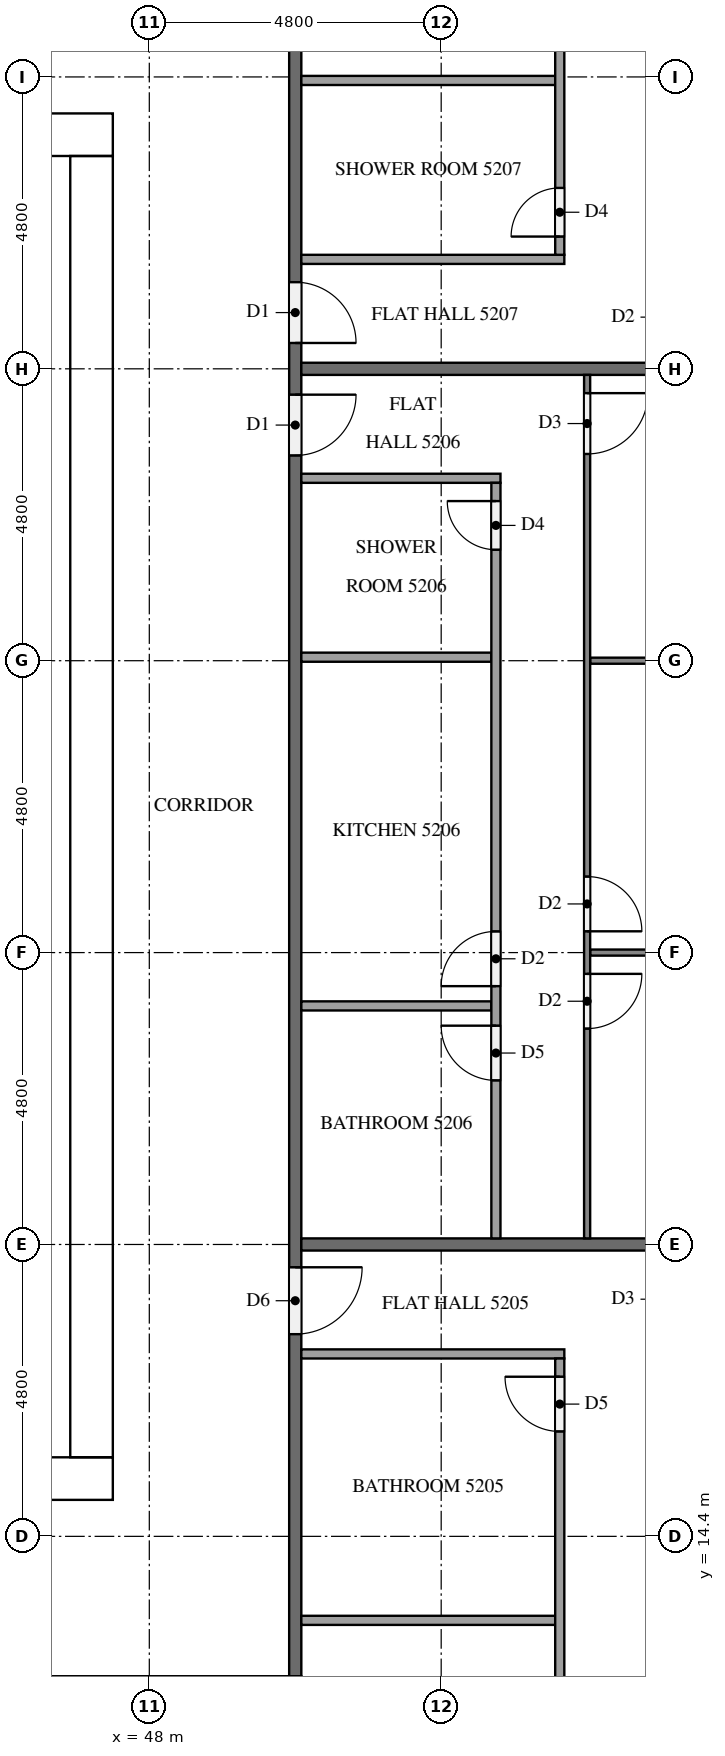
"""IFC4 building model, lengths in metres.
Left out: names, types, materials, properties, quantities, classifications, styles, units other than length and angle.
Written with IfcOpenShell. Run it as: python <this file> out.ifc"""

import sys

from ifc_helpers import new_model, si_unit, direction, frame, frame_2d, origin, place, context, subcontext, project, spatial, rectangle, extrude, element, fill, save


model = new_model("IFC4")
c1 = context("Model", 3, precision=1e-05, world=origin(), true_north=direction((0.0, 1.0)))
c2 = subcontext(c1, "Body", "Model", "MODEL_VIEW")
j1 = project(units=[si_unit("LENGTHUNIT", "METRE"), si_unit("PLANEANGLEUNIT", "RADIAN")], contexts=[c1])
p1 = place(None, origin())
s1 = spatial("IfcSite", under=j1, at=p1, CompositionType="ELEMENT")
p2 = place(p1, origin())
s2 = spatial("IfcBuilding", under=s1, at=p2, CompositionType="ELEMENT")
p3 = place(p2, frame((0.0, 0.0, 199.9)))
s3 = spatial("IfcBuildingStorey", under=s2, at=p3, CompositionType="ELEMENT", Elevation=199.9)
p4 = place(p3, frame((15.0, 15.35, 0.0), z_axis=(0.0, 0.0, 1.0), x_axis=(1.0, 0.0, 0.0)))
e1 = element("IfcWall", 1, at=p4, inside=s3, PredefinedType="SHEAR", context=c2, shape_type="SweptSolid", body=[
    extrude(rectangle(XDim=32.4, YDim=0.7, at=frame_2d((16.2, 0.0))), origin(), (0.0, 0.0, 1.0), 3.1),
])
p5 = place(p4, frame((15.3, 0.0, 0.0)))
e2 = element("IfcOpeningElement", 2, at=p5, cuts=e1, PredefinedType="OPENING", context=c2, shape_type="SweptSolid", body=[
    extrude(rectangle(XDim=1.8, YDim=2.1, at=frame_2d((0.9, 1.05))), frame((0.0, 0.36, 0.0), z_axis=(0.0, -1.0, 0.0), x_axis=(1.0, 0.0, 0.0)), (0.0, 0.0, 1.0), 0.72),
])
p6 = place(p3, frame((15.0, 37.45, 0.0), z_axis=(0.0, 0.0, 1.0), x_axis=(1.0, 0.0, 0.0)))
e3 = element("IfcWall", 3, at=p6, inside=s3, PredefinedType="SHEAR", context=c2, shape_type="SweptSolid", body=[
    extrude(rectangle(XDim=32.4, YDim=0.7, at=frame_2d((16.2, 0.0))), origin(), (0.0, 0.0, 1.0), 3.1),
])
p7 = place(p6, frame((15.3, 0.0, 0.0)))
e4 = element("IfcOpeningElement", 4, at=p7, cuts=e3, PredefinedType="OPENING", context=c2, shape_type="SweptSolid", body=[
    extrude(rectangle(XDim=1.8, YDim=2.1, at=frame_2d((0.9, 1.05))), frame((0.0, 0.36, 0.0), z_axis=(0.0, -1.0, 0.0), x_axis=(1.0, 0.0, 0.0)), (0.0, 0.0, 1.0), 0.72),
])
p8 = place(p6, frame((1.544, 0.0, 0.0)))
e5 = element("IfcOpeningElement", 5, at=p8, cuts=e3, PredefinedType="OPENING", context=c2, shape_type="SweptSolid", body=[
    extrude(rectangle(XDim=1.0, YDim=2.1, at=frame_2d((0.5, 1.05))), frame((0.0, 0.36, 0.0), z_axis=(0.0, -1.0, 0.0), x_axis=(1.0, 0.0, 0.0)), (0.0, 0.0, 1.0), 0.72),
])
p9 = place(p6, frame((5.219, 0.0, 0.0)))
e6 = element("IfcOpeningElement", 6, at=p9, cuts=e3, PredefinedType="OPENING", context=c2, shape_type="SweptSolid", body=[
    extrude(rectangle(XDim=1.0, YDim=2.1, at=frame_2d((0.5, 1.05))), frame((0.0, 0.36, 0.0), z_axis=(0.0, -1.0, 0.0), x_axis=(1.0, 0.0, 0.0)), (0.0, 0.0, 1.0), 0.72),
])
p10 = place(p3, frame((47.05, 15.7, 0.0), z_axis=(0.0, 0.0, 1.0), x_axis=(0.0, 1.0, 0.0)))
e7 = element("IfcWall", 7, at=p10, inside=s3, PredefinedType="SHEAR", context=c2, shape_type="SweptSolid", body=[
    extrude(rectangle(XDim=21.4, YDim=0.7, at=frame_2d((10.7, 0.0))), origin(), (0.0, 0.0, 1.0), 3.1),
])
p11 = place(p10, frame((10.4, 0.0, 0.0)))
e8 = element("IfcOpeningElement", 8, at=p11, cuts=e7, PredefinedType="OPENING", context=c2, shape_type="SweptSolid", body=[
    extrude(rectangle(XDim=1.2, YDim=2.1, at=frame_2d((0.6, 1.05))), frame((0.0, 0.36, 0.0), z_axis=(0.0, -1.0, 0.0), x_axis=(1.0, 0.0, 0.0)), (0.0, 0.0, 1.0), 0.72),
])
p12 = place(p3, frame((50.5, 12.0, 0.0), z_axis=(0.0, 0.0, 1.0), x_axis=(-1.0, 0.0, 0.0)))
e9 = element("IfcWall", 9, at=p12, inside=s3, PredefinedType="PARTITIONING", context=c2, shape_type="SweptSolid", body=[
    extrude(rectangle(XDim=38.6, YDim=0.2, at=frame_2d((19.3, 0.0))), origin(), (0.0, 0.0, 1.0), 3.1),
])
p13 = place(p12, frame((26.875, 0.0, 0.0)))
e10 = element("IfcOpeningElement", 10, at=p13, cuts=e9, PredefinedType="OPENING", context=c2, shape_type="SweptSolid", body=[
    extrude(rectangle(XDim=1.1, YDim=2.1, at=frame_2d((0.55, 1.05))), frame((0.0, 0.11, 0.0), z_axis=(0.0, -1.0, 0.0), x_axis=(1.0, 0.0, 0.0)), (0.0, 0.0, 1.0), 0.22),
])
p14 = place(p12, frame((25.075, 0.0, 0.0)))
e11 = element("IfcOpeningElement", 11, at=p14, cuts=e9, PredefinedType="OPENING", context=c2, shape_type="SweptSolid", body=[
    extrude(rectangle(XDim=1.0, YDim=2.1, at=frame_2d((0.5, 1.05))), frame((0.0, 0.11, 0.0), z_axis=(0.0, -1.0, 0.0), x_axis=(1.0, 0.0, 0.0)), (0.0, 0.0, 1.0), 0.22),
])
p15 = place(p12, frame((10.125, 0.0, 0.0)))
e12 = element("IfcOpeningElement", 12, at=p15, cuts=e9, PredefinedType="OPENING", context=c2, shape_type="SweptSolid", body=[
    extrude(rectangle(XDim=1.0, YDim=2.1, at=frame_2d((0.5, 1.05))), frame((0.0, 0.11, 0.0), z_axis=(0.0, -1.0, 0.0), x_axis=(1.0, 0.0, 0.0)), (0.0, 0.0, 1.0), 0.22),
])
p16 = place(p12, frame((8.275, 0.0, 0.0)))
e13 = element("IfcOpeningElement", 13, at=p16, cuts=e9, PredefinedType="OPENING", context=c2, shape_type="SweptSolid", body=[
    extrude(rectangle(XDim=1.0, YDim=2.1, at=frame_2d((0.5, 1.05))), frame((0.0, 0.11, 0.0), z_axis=(0.0, -1.0, 0.0), x_axis=(1.0, 0.0, 0.0)), (0.0, 0.0, 1.0), 0.22),
])
p17 = place(p3, frame((50.4, 40.7, 0.0), z_axis=(0.0, 0.0, 1.0), x_axis=(0.0, -1.0, 0.0)))
e14 = element("IfcWall", 14, at=p17, inside=s3, PredefinedType="PARTITIONING", context=c2, shape_type="SweptSolid", body=[
    extrude(rectangle(XDim=28.6, YDim=0.2, at=frame_2d((14.3, 0.0))), origin(), (0.0, 0.0, 1.0), 3.1),
])
p18 = place(p17, frame((21.875, 0.0, 0.0)))
e15 = element("IfcOpeningElement", 15, at=p18, cuts=e14, PredefinedType="OPENING", context=c2, shape_type="SweptSolid", body=[
    extrude(rectangle(XDim=1.1, YDim=2.1, at=frame_2d((0.55, 1.05))), frame((0.0, 0.11, 0.0), z_axis=(0.0, -1.0, 0.0), x_axis=(1.0, 0.0, 0.0)), (0.0, 0.0, 1.0), 0.22),
])
p19 = place(p17, frame((7.525, 0.0, 0.0)))
e16 = element("IfcOpeningElement", 16, at=p19, cuts=e14, PredefinedType="OPENING", context=c2, shape_type="SweptSolid", body=[
    extrude(rectangle(XDim=1.0, YDim=2.1, at=frame_2d((0.5, 1.05))), frame((0.0, 0.11, 0.0), z_axis=(0.0, -1.0, 0.0), x_axis=(1.0, 0.0, 0.0)), (0.0, 0.0, 1.0), 0.22),
])
p20 = place(p17, frame((5.675, 0.0, 0.0)))
e17 = element("IfcOpeningElement", 17, at=p20, cuts=e14, PredefinedType="OPENING", context=c2, shape_type="SweptSolid", body=[
    extrude(rectangle(XDim=1.0, YDim=2.1, at=frame_2d((0.5, 1.05))), frame((0.0, 0.11, 0.0), z_axis=(0.0, -1.0, 0.0), x_axis=(1.0, 0.0, 0.0)), (0.0, 0.0, 1.0), 0.22),
])
p21 = place(p3, frame((50.5, 19.2, 0.0), z_axis=(0.0, 0.0, 1.0), x_axis=(1.0, 0.0, 0.0)))
e18 = element("IfcWall", 18, at=p21, inside=s3, PredefinedType="PARTITIONING", context=c2, shape_type="SweptSolid", body=[
    extrude(rectangle(XDim=11.8, YDim=0.2, at=frame_2d((5.9, 0.0))), origin(), (0.0, 0.0, 1.0), 3.1),
])
p22 = place(p3, frame((50.5, 33.6, 0.0), z_axis=(0.0, 0.0, 1.0), x_axis=(1.0, 0.0, 0.0)))
e19 = element("IfcWall", 19, at=p22, inside=s3, PredefinedType="PARTITIONING", context=c2, shape_type="SweptSolid", body=[
    extrude(rectangle(XDim=11.575, YDim=0.2, at=frame_2d((5.788, 0.0))), origin(), (0.0, 0.0, 1.0), 3.1),
])
p23 = place(p3, frame((50.5, 13.019, 0.0), z_axis=(0.0, 0.0, 1.0), x_axis=(1.0, 0.0, 0.0)))
e20 = element("IfcWall", 20, at=p23, inside=s3, PredefinedType="PARTITIONING", context=c2, shape_type="SweptSolid", body=[
    extrude(rectangle(XDim=4.175, YDim=0.15, at=frame_2d((2.087, 0.0))), origin(), (0.0, 0.0, 1.0), 3.1),
])
p24 = place(p3, frame((50.5, 17.4, 0.0), z_axis=(0.0, 0.0, 1.0), x_axis=(1.0, 0.0, 0.0)))
e21 = element("IfcWall", 21, at=p24, inside=s3, PredefinedType="PARTITIONING", context=c2, shape_type="SweptSolid", body=[
    extrude(rectangle(XDim=4.325, YDim=0.15, at=frame_2d((2.163, 0.0))), origin(), (0.0, 0.0, 1.0), 3.1),
])
p25 = place(p3, frame((54.75, 0.1, 0.0), z_axis=(0.0, 0.0, 1.0), x_axis=(0.0, 1.0, 0.0)))
e22 = element("IfcWall", 22, at=p25, inside=s3, PredefinedType="PARTITIONING", context=c2, shape_type="SweptSolid", body=[
    extrude(rectangle(XDim=17.225, YDim=0.15, at=frame_2d((8.612, 0.0))), origin(), (0.0, 0.0, 1.0), 3.1),
])
p26 = place(p25, frame((16.025, 0.0, 0.0)))
e23 = element("IfcOpeningElement", 23, at=p26, cuts=e22, PredefinedType="OPENING", context=c2, shape_type="SweptSolid", body=[
    extrude(rectangle(XDim=0.9, YDim=2.1, at=frame_2d((0.45, 1.05))), frame((0.0, 0.085, 0.0), z_axis=(0.0, -1.0, 0.0), x_axis=(1.0, 0.0, 0.0)), (0.0, 0.0, 1.0), 0.17),
])
p27 = place(p25, frame((10.014, 0.0, 0.0)))
e24 = element("IfcOpeningElement", 24, at=p27, cuts=e22, PredefinedType="OPENING", context=c2, shape_type="SweptSolid", body=[
    extrude(rectangle(XDim=0.8, YDim=2.1, at=frame_2d((0.4, 1.05))), frame((0.0, 0.085, 0.0), z_axis=(0.0, -1.0, 0.0), x_axis=(1.0, 0.0, 0.0)), (0.0, 0.0, 1.0), 0.17),
])
p28 = place(p25, frame((8.464, 0.0, 0.0)))
e25 = element("IfcOpeningElement", 25, at=p28, cuts=e22, PredefinedType="OPENING", context=c2, shape_type="SweptSolid", body=[
    extrude(rectangle(XDim=0.9, YDim=2.1, at=frame_2d((0.45, 1.05))), frame((0.0, 0.085, 0.0), z_axis=(0.0, -1.0, 0.0), x_axis=(1.0, 0.0, 0.0)), (0.0, 0.0, 1.0), 0.17),
])
p29 = place(p25, frame((0.35, 0.0, 0.0)))
e26 = element("IfcOpeningElement", 26, at=p29, cuts=e22, PredefinedType="OPENING", context=c2, shape_type="SweptSolid", body=[
    extrude(rectangle(XDim=0.8, YDim=2.1, at=frame_2d((0.4, 1.05))), frame((0.0, 0.085, 0.0), z_axis=(0.0, -1.0, 0.0), x_axis=(1.0, 0.0, 0.0)), (0.0, 0.0, 1.0), 0.17),
])
p30 = place(p3, frame((55.25, 28.8, 0.0), z_axis=(0.0, 0.0, 1.0), x_axis=(1.0, 0.0, 0.0)))
e27 = element("IfcWall", 27, at=p30, inside=s3, PredefinedType="PARTITIONING", context=c2, shape_type="SweptSolid", body=[
    extrude(rectangle(XDim=7.05, YDim=0.1, at=frame_2d((3.525, 0.0))), origin(), (0.0, 0.0, 1.0), 3.1),
])
p31 = place(p3, frame((55.25, 24.0, 0.0), z_axis=(0.0, 0.0, 1.0), x_axis=(1.0, 0.0, 0.0)))
e28 = element("IfcWall", 28, at=p31, inside=s3, PredefinedType="PARTITIONING", context=c2, shape_type="SweptSolid", body=[
    extrude(rectangle(XDim=6.825, YDim=0.1, at=frame_2d((3.413, 0.0))), origin(), (0.0, 0.0, 1.0), 3.1),
])
p32 = place(p3, frame((55.2, 33.5, 0.0), z_axis=(0.0, 0.0, 1.0), x_axis=(0.0, -1.0, 0.0)))
e29 = element("IfcWall", 29, at=p32, inside=s3, PredefinedType="PARTITIONING", context=c2, shape_type="SweptSolid", body=[
    extrude(rectangle(XDim=14.2, YDim=0.1, at=frame_2d((7.1, 0.0))), origin(), (0.0, 0.0, 1.0), 3.1),
])
p33 = place(p32, frame((0.3, 0.0, 0.0)))
e30 = element("IfcOpeningElement", 30, at=p33, cuts=e29, PredefinedType="OPENING", context=c2, shape_type="SweptSolid", body=[
    extrude(rectangle(XDim=1.0, YDim=2.1, at=frame_2d((0.5, 1.05))), frame((0.0, 0.06, 0.0), z_axis=(0.0, -1.0, 0.0), x_axis=(1.0, 0.0, 0.0)), (0.0, 0.0, 1.0), 0.12),
])
p34 = place(p32, frame((8.25, 0.0, 0.0)))
e31 = element("IfcOpeningElement", 31, at=p34, cuts=e29, PredefinedType="OPENING", context=c2, shape_type="SweptSolid", body=[
    extrude(rectangle(XDim=0.9, YDim=2.1, at=frame_2d((0.45, 1.05))), frame((0.0, 0.06, 0.0), z_axis=(0.0, -1.0, 0.0), x_axis=(1.0, 0.0, 0.0)), (0.0, 0.0, 1.0), 0.12),
])
p35 = place(p32, frame((9.85, 0.0, 0.0)))
e32 = element("IfcOpeningElement", 32, at=p35, cuts=e29, PredefinedType="OPENING", context=c2, shape_type="SweptSolid", body=[
    extrude(rectangle(XDim=0.9, YDim=2.1, at=frame_2d((0.45, 1.05))), frame((0.0, 0.06, 0.0), z_axis=(0.0, -1.0, 0.0), x_axis=(1.0, 0.0, 0.0)), (0.0, 0.0, 1.0), 0.12),
])
for number, where, z_axis, x_axis in (
    (33, (50.5, 28.858, 0.0), (0.0, 0.0, 1.0), (1.0, 0.0, 0.0)),
    (34, (50.5, 23.123, 0.0), (0.0, 0.0, 1.0), (1.0, 0.0, 0.0)),
):
    element("IfcWall", number, at=place(p3, frame(where, z_axis=z_axis, x_axis=x_axis)), inside=s3, PredefinedType="PARTITIONING", context=c2, shape_type="SweptSolid", body=[
        extrude(rectangle(XDim=3.125, YDim=0.15, at=frame_2d((1.562, 0.0))), origin(), (0.0, 0.0, 1.0), 3.1),
    ])
p36 = place(p3, frame((50.5, 31.8, 0.0), z_axis=(0.0, 0.0, 1.0), x_axis=(1.0, 0.0, 0.0)))
e35 = element("IfcWall", 35, at=p36, inside=s3, PredefinedType="PARTITIONING", context=c2, shape_type="SweptSolid", body=[
    extrude(rectangle(XDim=3.275, YDim=0.15, at=frame_2d((1.637, 0.0))), origin(), (0.0, 0.0, 1.0), 3.1),
])
p37 = place(p3, frame((53.7, 19.3, 0.0), z_axis=(0.0, 0.0, 1.0), x_axis=(0.0, 1.0, 0.0)))
e36 = element("IfcWall", 36, at=p37, inside=s3, PredefinedType="PARTITIONING", context=c2, shape_type="SweptSolid", body=[
    extrude(rectangle(XDim=12.425, YDim=0.15, at=frame_2d((6.212, 0.0))), origin(), (0.0, 0.0, 1.0), 3.1),
])
p38 = place(p37, frame((11.325, 0.0, 0.0)))
e37 = element("IfcOpeningElement", 37, at=p38, cuts=e36, PredefinedType="OPENING", context=c2, shape_type="SweptSolid", body=[
    extrude(rectangle(XDim=0.8, YDim=2.1, at=frame_2d((0.4, 1.05))), frame((0.0, 0.085, 0.0), z_axis=(0.0, -1.0, 0.0), x_axis=(1.0, 0.0, 0.0)), (0.0, 0.0, 1.0), 0.17),
])
p39 = place(p37, frame((4.148, 0.0, 0.0)))
e38 = element("IfcOpeningElement", 38, at=p39, cuts=e36, PredefinedType="OPENING", context=c2, shape_type="SweptSolid", body=[
    extrude(rectangle(XDim=0.9, YDim=2.1, at=frame_2d((0.45, 1.05))), frame((0.0, 0.085, 0.0), z_axis=(0.0, -1.0, 0.0), x_axis=(1.0, 0.0, 0.0)), (0.0, 0.0, 1.0), 0.17),
])
p40 = place(p37, frame((2.598, 0.0, 0.0)))
e39 = element("IfcOpeningElement", 39, at=p40, cuts=e36, PredefinedType="OPENING", context=c2, shape_type="SweptSolid", body=[
    extrude(rectangle(XDim=0.9, YDim=2.1, at=frame_2d((0.45, 1.05))), frame((0.0, 0.085, 0.0), z_axis=(0.0, -1.0, 0.0), x_axis=(1.0, 0.0, 0.0)), (0.0, 0.0, 1.0), 0.17),
])
p41 = place(p3, frame((50.5, 38.342, 0.0), z_axis=(0.0, 0.0, 1.0), x_axis=(1.0, 0.0, 0.0)))
e40 = element("IfcWall", 40, at=p41, inside=s3, PredefinedType="PARTITIONING", context=c2, shape_type="SweptSolid", body=[
    extrude(rectangle(XDim=4.175, YDim=0.15, at=frame_2d((2.087, 0.0))), origin(), (0.0, 0.0, 1.0), 3.1),
])
p42 = place(p3, frame((50.5, 35.4, 0.0), z_axis=(0.0, 0.0, 1.0), x_axis=(1.0, 0.0, 0.0)))
e41 = element("IfcWall", 41, at=p42, inside=s3, PredefinedType="PARTITIONING", context=c2, shape_type="SweptSolid", body=[
    extrude(rectangle(XDim=4.325, YDim=0.15, at=frame_2d((2.163, 0.0))), origin(), (0.0, 0.0, 1.0), 3.1),
])
p43 = place(p3, frame((54.75, 35.475, 0.0), z_axis=(0.0, 0.0, 1.0), x_axis=(0.0, 1.0, 0.0)))
e42 = element("IfcWall", 42, at=p43, inside=s3, PredefinedType="PARTITIONING", context=c2, shape_type="SweptSolid", body=[
    extrude(rectangle(XDim=12.425, YDim=0.15, at=frame_2d((6.212, 0.0))), origin(), (0.0, 0.0, 1.0), 3.1),
])
p44 = place(p43, frame((0.3, 0.0, 0.0)))
e43 = element("IfcOpeningElement", 43, at=p44, cuts=e42, PredefinedType="OPENING", context=c2, shape_type="SweptSolid", body=[
    extrude(rectangle(XDim=0.8, YDim=2.1, at=frame_2d((0.4, 1.05))), frame((0.0, 0.085, 0.0), z_axis=(0.0, -1.0, 0.0), x_axis=(1.0, 0.0, 0.0)), (0.0, 0.0, 1.0), 0.17),
])
p45 = place(p43, frame((5.465, 0.0, 0.0)))
e44 = element("IfcOpeningElement", 44, at=p45, cuts=e42, PredefinedType="OPENING", context=c2, shape_type="SweptSolid", body=[
    extrude(rectangle(XDim=0.9, YDim=2.1, at=frame_2d((0.45, 1.05))), frame((0.0, 0.085, 0.0), z_axis=(0.0, -1.0, 0.0), x_axis=(1.0, 0.0, 0.0)), (0.0, 0.0, 1.0), 0.17),
])
p46 = place(p43, frame((7.015, 0.0, 0.0)))
e45 = element("IfcOpeningElement", 45, at=p46, cuts=e42, PredefinedType="OPENING", context=c2, shape_type="SweptSolid", body=[
    extrude(rectangle(XDim=0.9, YDim=2.1, at=frame_2d((0.45, 1.05))), frame((0.0, 0.085, 0.0), z_axis=(0.0, -1.0, 0.0), x_axis=(1.0, 0.0, 0.0)), (0.0, 0.0, 1.0), 0.17),
])
p47 = place(p11, origin())
e46 = element("IfcDoor", 46, at=p47, inside=s3, OperationType="SINGLE_SWING_RIGHT", PredefinedType="DOOR", context=c2, shape_type="SweptSolid", body=[
    extrude(rectangle(XDim=1.2, YDim=2.1, at=frame_2d((0.6, 1.05))), frame((0.0, 0.025, 0.0), z_axis=(0.0, -1.0, 0.0), x_axis=(1.0, 0.0, 0.0)), (0.0, 0.0, 1.0), 0.05),
])
fill(e8, e46)
p48 = place(p18, origin())
e47 = element("IfcDoor", 47, at=p48, inside=s3, OperationType="SINGLE_SWING_LEFT", PredefinedType="DOOR", context=c2, shape_type="SweptSolid", body=[
    extrude(rectangle(XDim=1.1, YDim=2.1, at=frame_2d((0.55, 1.05))), frame((0.0, 0.025, 0.0), z_axis=(0.0, -1.0, 0.0), x_axis=(1.0, 0.0, 0.0)), (0.0, 0.0, 1.0), 0.05),
])
fill(e15, e47)
p49 = place(p19, origin())
e48 = element("IfcDoor", 48, at=p49, inside=s3, OperationType="SINGLE_SWING_LEFT", PredefinedType="DOOR", context=c2, shape_type="SweptSolid", body=[
    extrude(rectangle(XDim=1.0, YDim=2.1, at=frame_2d((0.5, 1.05))), frame((0.0, 0.025, 0.0), z_axis=(0.0, -1.0, 0.0), x_axis=(1.0, 0.0, 0.0)), (0.0, 0.0, 1.0), 0.05),
])
fill(e16, e48)
p50 = place(p20, origin())
e49 = element("IfcDoor", 49, at=p50, inside=s3, OperationType="SINGLE_SWING_RIGHT", PredefinedType="DOOR", context=c2, shape_type="SweptSolid", body=[
    extrude(rectangle(XDim=1.0, YDim=2.1, at=frame_2d((0.5, 1.05))), frame((0.0, 0.025, 0.0), z_axis=(0.0, -1.0, 0.0), x_axis=(1.0, 0.0, 0.0)), (0.0, 0.0, 1.0), 0.05),
])
fill(e17, e49)
p51 = place(p26, origin())
e50 = element("IfcDoor", 50, at=p51, inside=s3, OperationType="SINGLE_SWING_RIGHT", PredefinedType="DOOR", context=c2, shape_type="SweptSolid", body=[
    extrude(rectangle(XDim=0.9, YDim=2.1, at=frame_2d((0.45, 1.05))), frame((0.0, 0.025, 0.0), z_axis=(0.0, -1.0, 0.0), x_axis=(1.0, 0.0, 0.0)), (0.0, 0.0, 1.0), 0.05),
])
fill(e23, e50)
p52 = place(p33, origin())
e51 = element("IfcDoor", 51, at=p52, inside=s3, OperationType="SINGLE_SWING_LEFT", PredefinedType="DOOR", context=c2, shape_type="SweptSolid", body=[
    extrude(rectangle(XDim=1.0, YDim=2.1, at=frame_2d((0.5, 1.05))), frame((0.0, 0.025, 0.0), z_axis=(0.0, -1.0, 0.0), x_axis=(1.0, 0.0, 0.0)), (0.0, 0.0, 1.0), 0.05),
])
fill(e30, e51)
p53 = place(p34, origin())
e52 = element("IfcDoor", 52, at=p53, inside=s3, OperationType="SINGLE_SWING_RIGHT", PredefinedType="DOOR", context=c2, shape_type="SweptSolid", body=[
    extrude(rectangle(XDim=0.9, YDim=2.1, at=frame_2d((0.45, 1.05))), frame((0.0, 0.025, 0.0), z_axis=(0.0, -1.0, 0.0), x_axis=(1.0, 0.0, 0.0)), (0.0, 0.0, 1.0), 0.05),
])
fill(e31, e52)
p54 = place(p35, origin())
e53 = element("IfcDoor", 53, at=p54, inside=s3, OperationType="SINGLE_SWING_LEFT", PredefinedType="DOOR", context=c2, shape_type="SweptSolid", body=[
    extrude(rectangle(XDim=0.9, YDim=2.1, at=frame_2d((0.45, 1.05))), frame((0.0, 0.025, 0.0), z_axis=(0.0, -1.0, 0.0), x_axis=(1.0, 0.0, 0.0)), (0.0, 0.0, 1.0), 0.05),
])
fill(e32, e53)
p55 = place(p38, origin())
e54 = element("IfcDoor", 54, at=p55, inside=s3, OperationType="SINGLE_SWING_RIGHT", PredefinedType="DOOR", context=c2, shape_type="SweptSolid", body=[
    extrude(rectangle(XDim=0.8, YDim=2.1, at=frame_2d((0.4, 1.05))), frame((0.0, 0.025, 0.0), z_axis=(0.0, -1.0, 0.0), x_axis=(1.0, 0.0, 0.0)), (0.0, 0.0, 1.0), 0.05),
])
fill(e37, e54)
p56 = place(p39, origin())
e55 = element("IfcDoor", 55, at=p56, inside=s3, OperationType="SINGLE_SWING_LEFT", PredefinedType="DOOR", context=c2, shape_type="SweptSolid", body=[
    extrude(rectangle(XDim=0.9, YDim=2.1, at=frame_2d((0.45, 1.05))), frame((0.0, 0.025, 0.0), z_axis=(0.0, -1.0, 0.0), x_axis=(1.0, 0.0, 0.0)), (0.0, 0.0, 1.0), 0.05),
])
fill(e38, e55)
p57 = place(p40, origin())
e56 = element("IfcDoor", 56, at=p57, inside=s3, OperationType="SINGLE_SWING_RIGHT", PredefinedType="DOOR", context=c2, shape_type="SweptSolid", body=[
    extrude(rectangle(XDim=0.9, YDim=2.1, at=frame_2d((0.45, 1.05))), frame((0.0, 0.025, 0.0), z_axis=(0.0, -1.0, 0.0), x_axis=(1.0, 0.0, 0.0)), (0.0, 0.0, 1.0), 0.05),
])
fill(e39, e56)
p58 = place(p44, origin())
e57 = element("IfcDoor", 57, at=p58, inside=s3, OperationType="SINGLE_SWING_LEFT", PredefinedType="DOOR", context=c2, shape_type="SweptSolid", body=[
    extrude(rectangle(XDim=0.8, YDim=2.1, at=frame_2d((0.4, 1.05))), frame((0.0, 0.025, 0.0), z_axis=(0.0, -1.0, 0.0), x_axis=(1.0, 0.0, 0.0)), (0.0, 0.0, 1.0), 0.05),
])
fill(e43, e57)
save(model, sys.argv[1])
